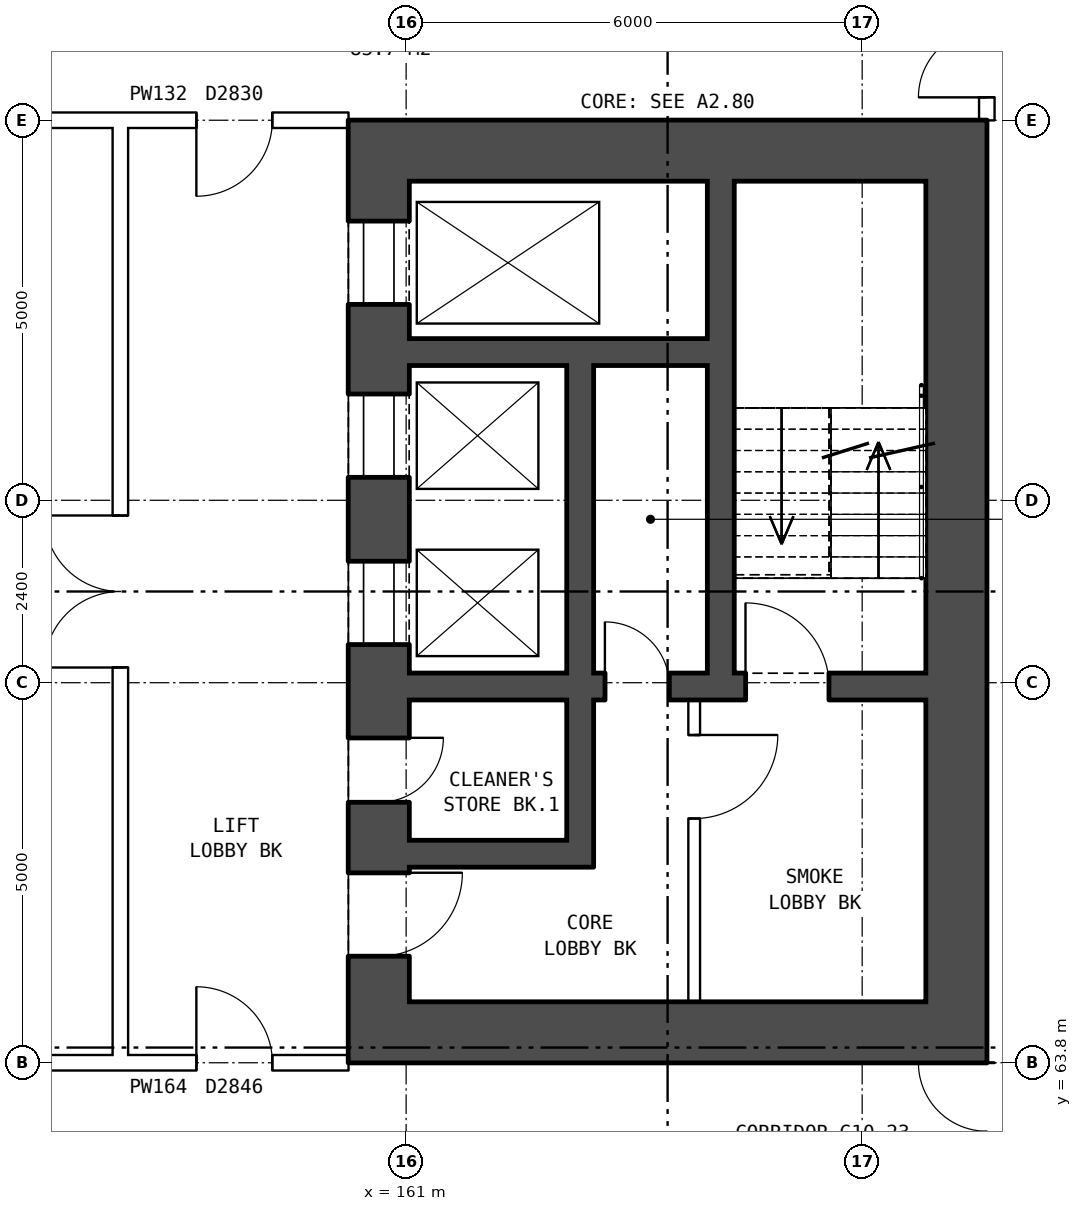
"""IFC4 building model, lengths in metres.
Left out: names, types, materials, properties, quantities, classifications, styles, units other than length and angle.
Written with IfcOpenShell. Run it as: python <this file> out.ifc"""

import sys

from ifc_helpers import new_model, si_unit, direction, frame, frame_2d, origin, place, context, subcontext, project, spatial, rectangle, extrude, element, fill, save


model = new_model("IFC4")
c1 = context("Model", 3, precision=1e-05, world=origin(), true_north=direction((0.0, 1.0)))
c2 = subcontext(c1, "Body", "Model", "MODEL_VIEW")
j1 = project(units=[si_unit("LENGTHUNIT", "METRE"), si_unit("PLANEANGLEUNIT", "RADIAN")], contexts=[c1])
p1 = place(None, origin())
s1 = spatial("IfcSite", under=j1, at=p1, CompositionType="ELEMENT")
p2 = place(p1, origin())
s2 = spatial("IfcBuilding", under=s1, at=p2, CompositionType="ELEMENT")
p3 = place(p2, frame((0.0, 0.0, 38.1)))
s3 = spatial("IfcBuildingStorey", under=s2, at=p3, CompositionType="ELEMENT", Elevation=38.1)
p4 = place(p3, frame((160.64, 75.4, 0.0), z_axis=(0.0, 0.0, 1.0), x_axis=(0.0, -1.0, 0.0)))
e1 = element("IfcWall", 1, at=p4, inside=s3, PredefinedType="SHEAR", context=c2, shape_type="SweptSolid", body=[
    extrude(rectangle(XDim=10.8, YDim=0.8, at=frame_2d((5.4, 0.0))), origin(), (0.0, 0.0, 1.0), 5.6),
])
p5 = place(p4, frame((0.525, 0.0, 0.0)))
e2 = element("IfcOpeningElement", 2, at=p5, cuts=e1, PredefinedType="OPENING", context=c2, shape_type="SweptSolid", body=[
    extrude(rectangle(XDim=1.1, YDim=2.1, at=frame_2d((0.55, 1.05))), frame((0.0, 0.41, 0.0), z_axis=(0.0, -1.0, 0.0), x_axis=(1.0, 0.0, 0.0)), (0.0, 0.0, 1.0), 0.82),
])
p6 = place(p4, frame((2.8, 0.0, 0.0)))
e3 = element("IfcOpeningElement", 3, at=p6, cuts=e1, PredefinedType="OPENING", context=c2, shape_type="SweptSolid", body=[
    extrude(rectangle(XDim=1.1, YDim=2.1, at=frame_2d((0.55, 1.05))), frame((0.0, 0.41, 0.0), z_axis=(0.0, -1.0, 0.0), x_axis=(1.0, 0.0, 0.0)), (0.0, 0.0, 1.0), 0.82),
])
p7 = place(p4, frame((5.0, 0.0, 0.0)))
e4 = element("IfcOpeningElement", 4, at=p7, cuts=e1, PredefinedType="OPENING", context=c2, shape_type="SweptSolid", body=[
    extrude(rectangle(XDim=1.1, YDim=2.1, at=frame_2d((0.55, 1.05))), frame((0.0, 0.41, 0.0), z_axis=(0.0, -1.0, 0.0), x_axis=(1.0, 0.0, 0.0)), (0.0, 0.0, 1.0), 0.82),
])
p8 = place(p4, frame((9.1, 0.0, 0.0)))
e5 = element("IfcOpeningElement", 5, at=p8, cuts=e1, PredefinedType="OPENING", context=c2, shape_type="SweptSolid", body=[
    extrude(rectangle(XDim=1.1, YDim=2.1, at=frame_2d((0.55, 1.05))), frame((0.0, 0.41, 0.0), z_axis=(0.0, -1.0, 0.0), x_axis=(1.0, 0.0, 0.0)), (0.0, 0.0, 1.0), 0.82),
])
p9 = place(p4, frame((7.325, 0.0, 0.0)))
e6 = element("IfcOpeningElement", 6, at=p9, cuts=e1, PredefinedType="OPENING", context=c2, shape_type="SweptSolid", body=[
    extrude(rectangle(XDim=0.85, YDim=2.1, at=frame_2d((0.425, 1.05))), frame((0.0, 0.41, 0.0), z_axis=(0.0, -1.0, 0.0), x_axis=(1.0, 0.0, 0.0)), (0.0, 0.0, 1.0), 0.82),
])
p10 = place(p3, frame((168.24, 75.4, 0.0), z_axis=(0.0, 0.0, 1.0), x_axis=(0.0, -1.0, 0.0)))
e7 = element("IfcWall", 7, at=p10, inside=s3, PredefinedType="SHEAR", context=c2, shape_type="SweptSolid", body=[
    extrude(rectangle(XDim=10.8, YDim=0.8, at=frame_2d((5.4, 0.0))), origin(), (0.0, 0.0, 1.0), 5.6),
])
for number, where, z_axis, x_axis in (
    (8, (160.24, 75.8, 0.0), (0.0, 0.0, 1.0), (1.0, 0.0, 0.0)),
    (9, (160.24, 64.2, 0.0), (0.0, 0.0, 1.0), (1.0, 0.0, 0.0)),
):
    element("IfcWall", number, at=place(p3, frame(where, z_axis=z_axis, x_axis=x_axis)), inside=s3, PredefinedType="SHEAR", context=c2, shape_type="SweptSolid", body=[
        extrude(rectangle(XDim=8.4, YDim=0.8, at=frame_2d((4.2, 0.0))), origin(), (0.0, 0.0, 1.0), 5.6),
    ])
p11 = place(p3, frame((161.04, 73.15, 0.0), z_axis=(0.0, 0.0, 1.0), x_axis=(1.0, 0.0, 0.0)))
e10 = element("IfcWall", 10, at=p11, inside=s3, PredefinedType="SHEAR", context=c2, shape_type="SweptSolid", body=[
    extrude(rectangle(XDim=3.925, YDim=0.35, at=frame_2d((1.962, 0.0))), origin(), (0.0, 0.0, 1.0), 5.6),
])
p12 = place(p3, frame((161.04, 68.75, 0.0), z_axis=(0.0, 0.0, 1.0), x_axis=(1.0, 0.0, 0.0)))
e11 = element("IfcWall", 11, at=p12, inside=s3, PredefinedType="SHEAR", context=c2, shape_type="SweptSolid", body=[
    extrude(rectangle(XDim=6.8, YDim=0.35, at=frame_2d((3.4, 0.0))), origin(), (0.0, 0.0, 1.0), 5.6),
])
p13 = place(p12, frame((4.425, 0.0, 0.0)))
e12 = element("IfcOpeningElement", 12, at=p13, cuts=e11, PredefinedType="OPENING", context=c2, shape_type="SweptSolid", body=[
    extrude(rectangle(XDim=1.1, YDim=2.1, at=frame_2d((0.55, 1.05))), frame((0.0, 0.185, 0.0), z_axis=(0.0, -1.0, 0.0), x_axis=(1.0, 0.0, 0.0)), (0.0, 0.0, 1.0), 0.37),
])
p14 = place(p12, frame((2.575, 0.0, 0.0)))
e13 = element("IfcOpeningElement", 13, at=p14, cuts=e11, PredefinedType="OPENING", context=c2, shape_type="SweptSolid", body=[
    extrude(rectangle(XDim=0.85, YDim=2.1, at=frame_2d((0.425, 1.05))), frame((0.0, 0.185, 0.0), z_axis=(0.0, -1.0, 0.0), x_axis=(1.0, 0.0, 0.0)), (0.0, 0.0, 1.0), 0.37),
])
p15 = place(p3, frame((161.04, 66.55, 0.0), z_axis=(0.0, 0.0, 1.0), x_axis=(1.0, 0.0, 0.0)))
e14 = element("IfcWall", 14, at=p15, inside=s3, PredefinedType="SHEAR", context=c2, shape_type="SweptSolid", body=[
    extrude(rectangle(XDim=2.075, YDim=0.35, at=frame_2d((1.038, 0.0))), origin(), (0.0, 0.0, 1.0), 5.6),
])
p16 = place(p3, frame((163.29, 72.975, 0.0), z_axis=(0.0, 0.0, 1.0), x_axis=(0.0, -1.0, 0.0)))
e15 = element("IfcWall", 15, at=p16, inside=s3, PredefinedType="SHEAR", context=c2, shape_type="SweptSolid", body=[
    extrude(rectangle(XDim=4.05, YDim=0.35, at=frame_2d((2.025, 0.0))), origin(), (0.0, 0.0, 1.0), 5.6),
])
p17 = place(p3, frame((163.29, 68.575, 0.0), z_axis=(0.0, 0.0, 1.0), x_axis=(0.0, -1.0, 0.0)))
e16 = element("IfcWall", 16, at=p17, inside=s3, PredefinedType="SHEAR", context=c2, shape_type="SweptSolid", body=[
    extrude(rectangle(XDim=2.2, YDim=0.35, at=frame_2d((1.1, 0.0))), origin(), (0.0, 0.0, 1.0), 5.6),
])
p18 = place(p3, frame((164.79, 68.575, 0.0), z_axis=(0.0, 0.0, 1.0), x_axis=(0.0, -1.0, 0.0)))
e17 = element("IfcWall", 17, at=p18, inside=s3, PredefinedType="PARTITIONING", context=c2, shape_type="SweptSolid", body=[
    extrude(rectangle(XDim=3.975, YDim=0.15, at=frame_2d((1.987, 0.0))), origin(), (0.0, 0.0, 1.0), 5.6),
])
p19 = place(p18, frame((0.462, 0.0, 0.0)))
e18 = element("IfcOpeningElement", 18, at=p19, cuts=e17, PredefinedType="OPENING", context=c2, shape_type="SweptSolid", body=[
    extrude(rectangle(XDim=1.1, YDim=2.1, at=frame_2d((0.55, 1.05))), frame((0.0, 0.085, 0.0), z_axis=(0.0, -1.0, 0.0), x_axis=(1.0, 0.0, 0.0)), (0.0, 0.0, 1.0), 0.17),
])
p20 = place(p3, frame((165.14, 75.4, 0.0), z_axis=(0.0, 0.0, 1.0), x_axis=(0.0, -1.0, 0.0)))
e19 = element("IfcWall", 19, at=p20, inside=s3, PredefinedType="SHEAR", context=c2, shape_type="SweptSolid", body=[
    extrude(rectangle(XDim=6.475, YDim=0.35, at=frame_2d((3.237, 0.0))), origin(), (0.0, 0.0, 1.0), 5.6),
])
p21 = place(p3, frame((157.24, 63.9, 0.0), z_axis=(0.0, 0.0, 1.0), x_axis=(0.0, 1.0, 0.0)))
e20 = element("IfcWall", 20, at=p21, inside=s3, PredefinedType="PARTITIONING", context=c2, shape_type="SweptSolid", body=[
    extrude(rectangle(XDim=12.2, YDim=0.2, at=frame_2d((6.1, 0.0))), origin(), (0.0, 0.0, 1.0), 5.6),
])
p22 = place(p21, frame((5.1, 0.0, 0.0)))
e21 = element("IfcOpeningElement", 21, at=p22, cuts=e20, PredefinedType="OPENING", context=c2, shape_type="SweptSolid", body=[
    extrude(rectangle(XDim=2.0, YDim=2.1, at=frame_2d((1.0, 1.05))), frame((0.0, 0.11, 0.0), z_axis=(0.0, -1.0, 0.0), x_axis=(1.0, 0.0, 0.0)), (0.0, 0.0, 1.0), 0.22),
])
p23 = place(p3, frame((142.76, 63.8, 0.0), z_axis=(0.0, 0.0, 1.0), x_axis=(1.0, 0.0, 0.0)))
e22 = element("IfcWall", 22, at=p23, inside=s3, PredefinedType="PARTITIONING", context=c2, shape_type="SweptSolid", body=[
    extrude(rectangle(XDim=14.48, YDim=0.2, at=frame_2d((7.24, 0.0))), origin(), (0.0, 0.0, 1.0), 5.6),
])
p24 = place(p23, frame((6.34, 0.0, 0.0)))
e23 = element("IfcOpeningElement", 23, at=p24, cuts=e22, PredefinedType="OPENING", context=c2, shape_type="SweptSolid", body=[
    extrude(rectangle(XDim=1.8, YDim=2.1, at=frame_2d((0.9, 1.05))), frame((0.0, 0.11, 0.0), z_axis=(0.0, -1.0, 0.0), x_axis=(1.0, 0.0, 0.0)), (0.0, 0.0, 1.0), 0.22),
])
p25 = place(p3, frame((157.24, 63.8, 0.0), z_axis=(0.0, 0.0, 1.0), x_axis=(1.0, 0.0, 0.0)))
e24 = element("IfcWall", 24, at=p25, inside=s3, PredefinedType="PARTITIONING", context=c2, shape_type="SweptSolid", body=[
    extrude(rectangle(XDim=3.0, YDim=0.2, at=frame_2d((1.5, 0.0))), origin(), (0.0, 0.0, 1.0), 5.6),
])
p26 = place(p25, frame((1.0, 0.0, 0.0)))
e25 = element("IfcOpeningElement", 25, at=p26, cuts=e24, PredefinedType="OPENING", context=c2, shape_type="SweptSolid", body=[
    extrude(rectangle(XDim=1.0, YDim=2.1, at=frame_2d((0.5, 1.05))), frame((0.0, 0.11, 0.0), z_axis=(0.0, -1.0, 0.0), x_axis=(1.0, 0.0, 0.0)), (0.0, 0.0, 1.0), 0.22),
])
p27 = place(p3, frame((142.76, 76.2, 0.0), z_axis=(0.0, 0.0, 1.0), x_axis=(1.0, 0.0, 0.0)))
e26 = element("IfcWall", 26, at=p27, inside=s3, PredefinedType="PARTITIONING", context=c2, shape_type="SweptSolid", body=[
    extrude(rectangle(XDim=14.48, YDim=0.2, at=frame_2d((7.24, 0.0))), origin(), (0.0, 0.0, 1.0), 5.6),
])
p28 = place(p27, frame((6.74, 0.0, 0.0)))
e27 = element("IfcOpeningElement", 27, at=p28, cuts=e26, PredefinedType="OPENING", context=c2, shape_type="SweptSolid", body=[
    extrude(rectangle(XDim=1.0, YDim=2.1, at=frame_2d((0.5, 1.05))), frame((0.0, 0.11, 0.0), z_axis=(0.0, -1.0, 0.0), x_axis=(1.0, 0.0, 0.0)), (0.0, 0.0, 1.0), 0.22),
])
p29 = place(p3, frame((157.24, 76.2, 0.0), z_axis=(0.0, 0.0, 1.0), x_axis=(1.0, 0.0, 0.0)))
e28 = element("IfcWall", 28, at=p29, inside=s3, PredefinedType="PARTITIONING", context=c2, shape_type="SweptSolid", body=[
    extrude(rectangle(XDim=3.0, YDim=0.2, at=frame_2d((1.5, 0.0))), origin(), (0.0, 0.0, 1.0), 5.6),
])
p30 = place(p29, frame((1.0, 0.0, 0.0)))
e29 = element("IfcOpeningElement", 29, at=p30, cuts=e28, PredefinedType="OPENING", context=c2, shape_type="SweptSolid", body=[
    extrude(rectangle(XDim=1.0, YDim=2.1, at=frame_2d((0.5, 1.05))), frame((0.0, 0.11, 0.0), z_axis=(0.0, -1.0, 0.0), x_axis=(1.0, 0.0, 0.0)), (0.0, 0.0, 1.0), 0.22),
])
p31 = place(p3, frame((168.64, 61.398, 0.0), z_axis=(0.0, 0.0, 1.0), x_axis=(0.0, 1.0, 0.0)))
e30 = element("IfcWall", 30, at=p31, inside=s3, PredefinedType="PARTITIONING", context=c2, shape_type="SweptSolid", body=[
    extrude(rectangle(XDim=2.402, YDim=0.2, at=frame_2d((1.201, 0.0))), origin(), (0.0, 0.0, 1.0), 5.6),
])
p32 = place(p31, frame((0.601, 0.0, 0.0)))
e31 = element("IfcOpeningElement", 31, at=p32, cuts=e30, PredefinedType="OPENING", context=c2, shape_type="SweptSolid", body=[
    extrude(rectangle(XDim=1.8, YDim=2.1, at=frame_2d((0.9, 1.05))), frame((0.0, 0.11, 0.0), z_axis=(0.0, -1.0, 0.0), x_axis=(1.0, 0.0, 0.0)), (0.0, 0.0, 1.0), 0.22),
])
p33 = place(p3, frame((168.64, 76.2, 0.0), z_axis=(0.0, 0.0, 1.0), x_axis=(0.0, 1.0, 0.0)))
e32 = element("IfcWall", 32, at=p33, inside=s3, PredefinedType="PARTITIONING", context=c2, shape_type="SweptSolid", body=[
    extrude(rectangle(XDim=2.402, YDim=0.2, at=frame_2d((1.201, 0.0))), origin(), (0.0, 0.0, 1.0), 5.6),
])
p34 = place(p33, frame((0.301, 0.0, 0.0)))
e33 = element("IfcOpeningElement", 33, at=p34, cuts=e32, PredefinedType="OPENING", context=c2, shape_type="SweptSolid", body=[
    extrude(rectangle(XDim=1.8, YDim=2.1, at=frame_2d((0.9, 1.05))), frame((0.0, 0.11, 0.0), z_axis=(0.0, -1.0, 0.0), x_axis=(1.0, 0.0, 0.0)), (0.0, 0.0, 1.0), 0.22),
])
p35 = place(p5, origin())
e34 = element("IfcDoor", 34, at=p35, inside=s3, OperationType="DOUBLE_DOOR_SLIDING", PredefinedType="DOOR", context=c2, shape_type="SweptSolid", body=[
    extrude(rectangle(XDim=1.1, YDim=2.1, at=frame_2d((0.55, 1.05))), frame((0.0, 0.385, 0.0), z_axis=(0.0, -1.0, 0.0), x_axis=(1.0, 0.0, 0.0)), (0.0, 0.0, 1.0), 0.05),
])
fill(e2, e34)
p36 = place(p6, origin())
e35 = element("IfcDoor", 35, at=p36, inside=s3, OperationType="DOUBLE_DOOR_SLIDING", PredefinedType="DOOR", context=c2, shape_type="SweptSolid", body=[
    extrude(rectangle(XDim=1.1, YDim=2.1, at=frame_2d((0.55, 1.05))), frame((0.0, 0.385, 0.0), z_axis=(0.0, -1.0, 0.0), x_axis=(1.0, 0.0, 0.0)), (0.0, 0.0, 1.0), 0.05),
])
fill(e3, e35)
p37 = place(p7, origin())
e36 = element("IfcDoor", 36, at=p37, inside=s3, OperationType="DOUBLE_DOOR_SLIDING", PredefinedType="DOOR", context=c2, shape_type="SweptSolid", body=[
    extrude(rectangle(XDim=1.1, YDim=2.1, at=frame_2d((0.55, 1.05))), frame((0.0, 0.385, 0.0), z_axis=(0.0, -1.0, 0.0), x_axis=(1.0, 0.0, 0.0)), (0.0, 0.0, 1.0), 0.05),
])
fill(e4, e36)
p38 = place(p8, origin())
e37 = element("IfcDoor", 37, at=p38, inside=s3, OperationType="SINGLE_SWING_LEFT", PredefinedType="DOOR", context=c2, shape_type="SweptSolid", body=[
    extrude(rectangle(XDim=1.1, YDim=2.1, at=frame_2d((0.55, 1.05))), frame((0.0, 0.385, 0.0), z_axis=(0.0, -1.0, 0.0), x_axis=(1.0, 0.0, 0.0)), (0.0, 0.0, 1.0), 0.05),
])
fill(e5, e37)
p39 = place(p19, origin())
e38 = element("IfcDoor", 38, at=p39, inside=s3, OperationType="SINGLE_SWING_LEFT", PredefinedType="DOOR", context=c2, shape_type="SweptSolid", body=[
    extrude(rectangle(XDim=1.1, YDim=2.1, at=frame_2d((0.55, 1.05))), frame((0.0, 0.025, 0.0), z_axis=(0.0, -1.0, 0.0), x_axis=(1.0, 0.0, 0.0)), (0.0, 0.0, 1.0), 0.05),
])
fill(e18, e38)
p40 = place(p13, origin())
e39 = element("IfcDoor", 39, at=p40, inside=s3, OperationType="SINGLE_SWING_LEFT", PredefinedType="DOOR", context=c2, shape_type="SweptSolid", body=[
    extrude(rectangle(XDim=1.1, YDim=2.1, at=frame_2d((0.55, 1.05))), frame((0.0, 0.025, 0.0), z_axis=(0.0, -1.0, 0.0), x_axis=(1.0, 0.0, 0.0)), (0.0, 0.0, 1.0), 0.05),
])
fill(e12, e39)
p41 = place(p9, origin())
e40 = element("IfcDoor", 40, at=p41, inside=s3, OperationType="SINGLE_SWING_LEFT", PredefinedType="DOOR", context=c2, shape_type="SweptSolid", body=[
    extrude(rectangle(XDim=0.85, YDim=2.1, at=frame_2d((0.425, 1.05))), frame((0.0, 0.385, 0.0), z_axis=(0.0, -1.0, 0.0), x_axis=(1.0, 0.0, 0.0)), (0.0, 0.0, 1.0), 0.05),
])
fill(e6, e40)
p42 = place(p14, origin())
e41 = element("IfcDoor", 41, at=p42, inside=s3, OperationType="SINGLE_SWING_LEFT", PredefinedType="DOOR", context=c2, shape_type="SweptSolid", body=[
    extrude(rectangle(XDim=0.85, YDim=2.1, at=frame_2d((0.425, 1.05))), frame((0.0, 0.025, 0.0), z_axis=(0.0, -1.0, 0.0), x_axis=(1.0, 0.0, 0.0)), (0.0, 0.0, 1.0), 0.05),
])
fill(e13, e41)
p43 = place(p22, origin())
e42 = element("IfcDoor", 42, at=p43, inside=s3, OperationType="DOUBLE_DOOR_SINGLE_SWING", PredefinedType="DOOR", context=c2, shape_type="SweptSolid", body=[
    extrude(rectangle(XDim=2.0, YDim=2.1, at=frame_2d((1.0, 1.05))), frame((0.0, 0.025, 0.0), z_axis=(0.0, -1.0, 0.0), x_axis=(1.0, 0.0, 0.0)), (0.0, 0.0, 1.0), 0.05),
])
fill(e21, e42)
p44 = place(p26, origin())
e43 = element("IfcDoor", 43, at=p44, inside=s3, OperationType="SINGLE_SWING_LEFT", PredefinedType="DOOR", context=c2, shape_type="SweptSolid", body=[
    extrude(rectangle(XDim=1.0, YDim=2.1, at=frame_2d((0.5, 1.05))), frame((0.0, 0.025, 0.0), z_axis=(0.0, -1.0, 0.0), x_axis=(1.0, 0.0, 0.0)), (0.0, 0.0, 1.0), 0.05),
])
fill(e25, e43)
p45 = place(p30, frame((1.0, 0.0, 0.0), z_axis=(0.0, 0.0, 1.0), x_axis=(-1.0, 0.0, 0.0)))
e44 = element("IfcDoor", 44, at=p45, inside=s3, OperationType="SINGLE_SWING_RIGHT", PredefinedType="DOOR", context=c2, shape_type="SweptSolid", body=[
    extrude(rectangle(XDim=1.0, YDim=2.1, at=frame_2d((0.5, 1.05))), frame((0.0, 0.025, 0.0), z_axis=(0.0, -1.0, 0.0), x_axis=(1.0, 0.0, 0.0)), (0.0, 0.0, 1.0), 0.05),
])
fill(e29, e44)
p46 = place(p32, origin())
e45 = element("IfcDoor", 45, at=p46, inside=s3, OperationType="DOUBLE_DOOR_SINGLE_SWING", PredefinedType="DOOR", context=c2, shape_type="SweptSolid", body=[
    extrude(rectangle(XDim=1.8, YDim=2.1, at=frame_2d((0.9, 1.05))), frame((0.0, 0.025, 0.0), z_axis=(0.0, -1.0, 0.0), x_axis=(1.0, 0.0, 0.0)), (0.0, 0.0, 1.0), 0.05),
])
fill(e31, e45)
p47 = place(p34, origin())
e46 = element("IfcDoor", 46, at=p47, inside=s3, OperationType="DOUBLE_DOOR_SINGLE_SWING", PredefinedType="DOOR", context=c2, shape_type="SweptSolid", body=[
    extrude(rectangle(XDim=1.8, YDim=2.1, at=frame_2d((0.9, 1.05))), frame((0.0, 0.025, 0.0), z_axis=(0.0, -1.0, 0.0), x_axis=(1.0, 0.0, 0.0)), (0.0, 0.0, 1.0), 0.05),
])
fill(e33, e46)
save(model, sys.argv[1])
